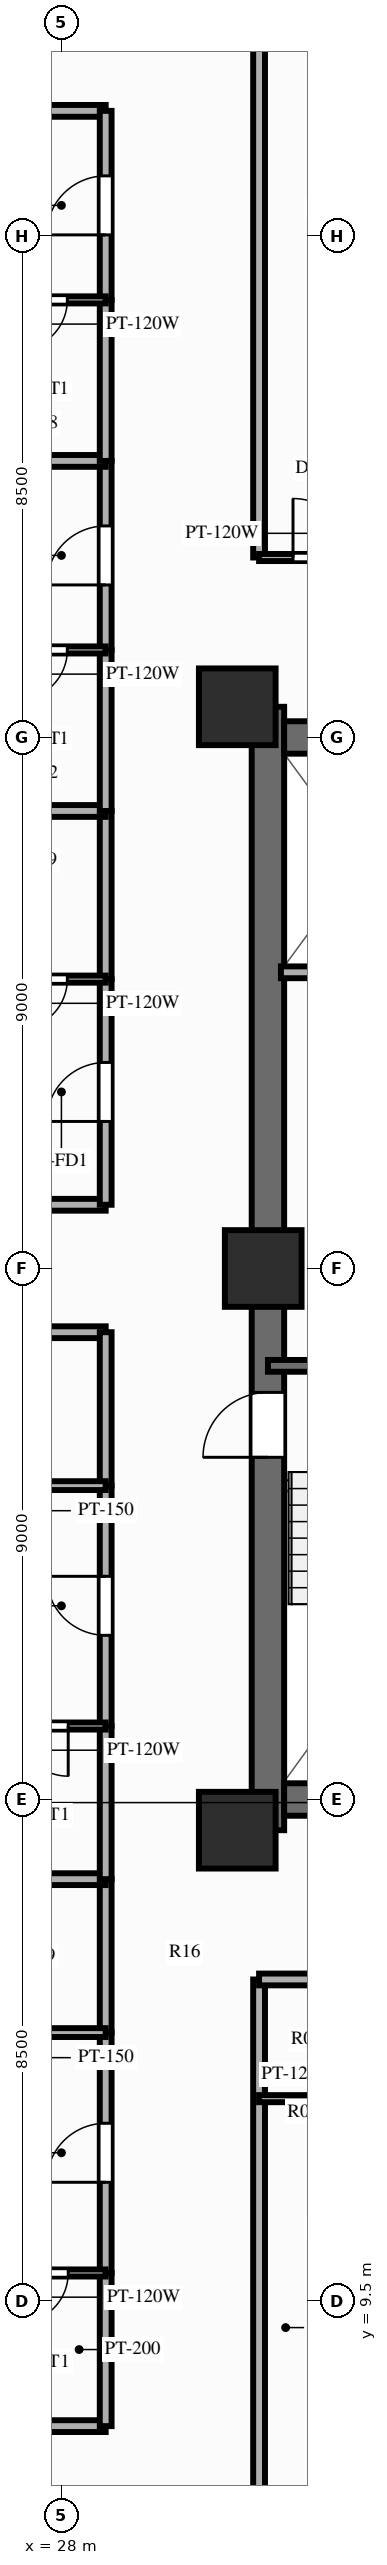
"""IFC4 building model, lengths in metres.
Left out: names, types, materials, properties, quantities, classifications, styles, units other than length and angle.
Written with IfcOpenShell. Run it as: python <this file> out.ifc"""

import sys

from ifc_helpers import new_model, si_unit, direction, frame, frame_2d, origin, origin_2d, place, context, subcontext, project, spatial, rectangle, extrude, source, transform, mapped, element, fill, save


model = new_model("IFC4")
c1 = context("Model", 3, precision=1e-05, world=origin(), true_north=direction((0.0, 1.0)))
c2 = subcontext(c1, "Body", "Model", "MODEL_VIEW")
j1 = project(units=[si_unit("LENGTHUNIT", "METRE"), si_unit("PLANEANGLEUNIT", "RADIAN")], contexts=[c1])
p1 = place(None, origin())
s1 = spatial("IfcSite", under=j1, at=p1, CompositionType="ELEMENT")
p2 = place(p1, origin())
s2 = spatial("IfcBuilding", under=s1, at=p2, CompositionType="ELEMENT")
p3 = place(p2, frame((0.0, 0.0, 113.85)))
s3 = spatial("IfcBuildingStorey", under=s2, at=p3, CompositionType="ELEMENT", Elevation=113.85)
p4 = place(p3, frame((31.5, 17.48, 0.0), z_axis=(0.0, 0.0, 1.0), x_axis=(0.0, 1.0, 0.0)))
e1 = element("IfcWall", 1, at=p4, inside=s3, PredefinedType="SHEAR", context=c2, shape_type="SweptSolid", body=[
    extrude(rectangle(XDim=19.04, YDim=0.55, at=frame_2d((9.52, 0.0))), origin(), (0.0, 0.0, 1.0), 3.0),
])
p5 = place(p4, frame((6.32, 0.0, 0.0)))
e2 = element("IfcOpeningElement", 2, at=p5, cuts=e1, PredefinedType="OPENING", context=c2, shape_type="SweptSolid", body=[
    extrude(rectangle(XDim=1.1, YDim=2.15, at=frame_2d((0.55, 1.075))), frame((0.0, 0.287, 0.0), z_axis=(0.0, -1.0, 0.0), x_axis=(1.0, 0.0, 0.0)), (0.0, 0.0, 1.0), 0.574),
])
p6 = place(p3, frame((31.775, 18.0, 0.0), z_axis=(0.0, 0.0, 1.0), x_axis=(1.0, 0.0, 0.0)))
e3 = element("IfcWall", 3, at=p6, inside=s3, PredefinedType="SHEAR", context=c2, shape_type="SweptSolid", body=[
    extrude(rectangle(XDim=12.45, YDim=0.55, at=frame_2d((6.225, 0.0))), origin(), (0.0, 0.0, 1.0), 3.0),
])
p7 = place(p3, frame((31.775, 36.0, 0.0), z_axis=(0.0, 0.0, 1.0), x_axis=(1.0, 0.0, 0.0)))
e4 = element("IfcWall", 4, at=p7, inside=s3, PredefinedType="SHEAR", context=c2, shape_type="SweptSolid", body=[
    extrude(rectangle(XDim=12.45, YDim=0.55, at=frame_2d((6.225, 0.0))), origin(), (0.0, 0.0, 1.0), 3.0),
])
p8 = place(p7, frame((5.175, 0.0, 0.0), z_axis=(0.0, 0.0, 1.0), x_axis=(-1.0, 0.0, 0.0)))
e5 = element("IfcOpeningElement", 5, at=p8, cuts=e4, PredefinedType="OPENING", context=c2, shape_type="SweptSolid", body=[
    extrude(rectangle(XDim=1.4, YDim=2.15, at=frame_2d((0.7, 1.075))), frame((0.0, 0.287, 0.0), z_axis=(0.0, -1.0, 0.0), x_axis=(1.0, 0.0, 0.0)), (0.0, 0.0, 1.0), 0.574),
])
m1 = source(origin(), c2, "Body", "SweptSolid", [
    extrude(rectangle(XDim=1.3, YDim=1.3, at=origin_2d()), origin(), (0.0, 0.0, 1.0), 3.0),
])
for number, where, z_axis, x_axis in (
    (6, (30.98, 17.48, 0.0), (0.0, 0.0, 1.0), (1.0, 0.0, 0.0)),
    (7, (30.98, 36.52, 0.0), (0.0, 0.0, 1.0), (1.0, 0.0, 0.0)),
    (8, (31.42, 27.0, 0.0), (0.0, 0.0, 1.0), (1.0, 0.0, 0.0)),
):
    element("IfcColumn", number, at=place(p3, frame(where, z_axis=z_axis, x_axis=x_axis)), inside=s3, PredefinedType="COLUMN", context=c2, shape_type="MappedRepresentation", body=[
        mapped(m1, transform((0.0, 0.0, 0.0), scale=1.0)),
    ])
p9 = place(p3, frame((31.5, 25.35, 0.0), z_axis=(0.0, 0.0, 1.0), x_axis=(1.0, 0.0, 0.0)))
e9 = element("IfcWall", 9, at=p9, inside=s3, PredefinedType="SOLIDWALL", context=c2, shape_type="SweptSolid", body=[
    extrude(rectangle(XDim=3.93, YDim=0.2, at=frame_2d((1.965, 0.0))), origin(), (0.0, 0.0, 1.0), 2.79),
])
p10 = place(p3, frame((31.72, 32.02, 0.0), z_axis=(0.0, 0.0, 1.0), x_axis=(1.0, 0.0, 0.0)))
e10 = element("IfcWall", 10, at=p10, inside=s3, PredefinedType="PARTITIONING", context=c2, shape_type="SweptSolid", body=[
    extrude(rectangle(XDim=2.8, YDim=0.2, at=frame_2d((1.4, 0.0))), origin(), (0.0, 0.0, 1.0), 2.79),
])
p11 = place(p3, frame((31.35, 14.95, 0.0), z_axis=(0.0, 0.0, 1.0), x_axis=(0.0, -1.0, 0.0)))
e11 = element("IfcWall", 11, at=p11, inside=s3, PredefinedType="PARTITIONING", context=c2, shape_type="SweptSolid", body=[
    extrude(rectangle(XDim=11.8, YDim=0.2, at=frame_2d((5.9, 0.0))), origin(), (0.0, 0.0, 1.0), 2.34),
])
p12 = place(p3, frame((31.35, 14.95, 0.0), z_axis=(0.0, 0.0, 1.0), x_axis=(1.0, 0.0, 0.0)))
e12 = element("IfcWall", 12, at=p12, inside=s3, PredefinedType="PARTITIONING", context=c2, shape_type="SweptSolid", body=[
    extrude(rectangle(XDim=3.458, YDim=0.2, at=frame_2d((1.729, 0.0))), origin(), (0.0, 0.0, 1.0), 2.79),
])
p13 = place(p3, frame((31.35, 12.93, 0.0), z_axis=(0.0, 0.0, 1.0), x_axis=(1.0, 0.0, 0.0)))
e13 = element("IfcWall", 13, at=p13, inside=s3, PredefinedType="PARTITIONING", context=c2, shape_type="SweptSolid", body=[
    extrude(rectangle(XDim=3.458, YDim=0.12, at=frame_2d((1.729, 0.0))), origin(), (0.0, 0.0, 1.0), 2.79),
])
p14 = place(p3, frame((31.35, 39.05, 0.0), z_axis=(0.0, 0.0, 1.0), x_axis=(0.0, 1.0, 0.0)))
e14 = element("IfcWall", 14, at=p14, inside=s3, PredefinedType="PARTITIONING", context=c2, shape_type="SweptSolid", body=[
    extrude(rectangle(XDim=11.8, YDim=0.2, at=frame_2d((5.9, 0.0))), origin(), (0.0, 0.0, 1.0), 2.34),
])
p15 = place(p3, frame((31.35, 39.05, 0.0), z_axis=(0.0, 0.0, 1.0), x_axis=(1.0, 0.0, 0.0)))
e15 = element("IfcWall", 15, at=p15, inside=s3, PredefinedType="PARTITIONING", context=c2, shape_type="SweptSolid", body=[
    extrude(rectangle(XDim=2.15, YDim=0.12, at=frame_2d((1.075, 0.0))), origin(), (0.0, 0.0, 1.0), 2.79),
])
p16 = place(p15, frame((0.575, 0.0, 0.0)))
e16 = element("IfcOpeningElement", 16, at=p16, cuts=e15, PredefinedType="OPENING", context=c2, shape_type="SweptSolid", body=[
    extrude(rectangle(XDim=1.0, YDim=2.1, at=frame_2d((0.5, 1.05))), frame((0.0, 0.072, 0.0), z_axis=(0.0, -1.0, 0.0), x_axis=(1.0, 0.0, 0.0)), (0.0, 0.0, 1.0), 0.144),
])
for number, where, z_axis, x_axis in (
    (17, (28.75, 7.38, 0.0), (0.0, 0.0, 1.0), (-1.0, 0.0, 0.0)),
    (18, (28.75, 25.92, 0.0), (0.0, 0.0, 1.0), (-1.0, 0.0, 0.0)),
):
    element("IfcWall", number, at=place(p3, frame(where, z_axis=z_axis, x_axis=x_axis)), inside=s3, PredefinedType="PARTITIONING", context=c2, shape_type="SweptSolid", body=[
        extrude(rectangle(XDim=16.6, YDim=0.2, at=frame_2d((8.3, 0.0))), origin(), (0.0, 0.0, 1.0), 2.79),
    ])
p17 = place(p3, frame((28.75, 7.38, 0.0), z_axis=(0.0, 0.0, 1.0), x_axis=(0.0, 1.0, 0.0)))
e19 = element("IfcWall", 19, at=p17, inside=s3, PredefinedType="PARTITIONING", context=c2, shape_type="SweptSolid", body=[
    extrude(rectangle(XDim=2.596, YDim=0.2, at=frame_2d((1.298, 0.0))), origin(), (0.0, 0.0, 1.0), 2.79),
])
p18 = place(p3, frame((28.75, 9.976, 0.0), z_axis=(0.0, 0.0, 1.0), x_axis=(0.0, 1.0, 0.0)))
e20 = element("IfcWall", 20, at=p18, inside=s3, PredefinedType="PARTITIONING", context=c2, shape_type="SweptSolid", body=[
    extrude(rectangle(XDim=4.074, YDim=0.2, at=frame_2d((2.037, 0.0))), origin(), (0.0, 0.0, 1.0), 2.79),
])
p19 = place(p18, frame((1.537, 0.0, 0.0)))
e21 = element("IfcOpeningElement", 21, at=p19, cuts=e20, PredefinedType="OPENING", context=c2, shape_type="SweptSolid", body=[
    extrude(rectangle(XDim=1.0, YDim=2.15, at=frame_2d((0.5, 1.075))), frame((0.0, 0.112, 0.0), z_axis=(0.0, -1.0, 0.0), x_axis=(1.0, 0.0, 0.0)), (0.0, 0.0, 1.0), 0.224),
])
p20 = place(p3, frame((28.75, 14.05, 0.0), z_axis=(0.0, 0.0, 1.0), x_axis=(0.0, 1.0, 0.0)))
e22 = element("IfcWall", 22, at=p20, inside=s3, PredefinedType="PARTITIONING", context=c2, shape_type="SweptSolid", body=[
    extrude(rectangle(XDim=2.6, YDim=0.2, at=frame_2d((1.3, 0.0))), origin(), (0.0, 0.0, 1.0), 2.79),
])
p21 = place(p3, frame((28.75, 9.976, 0.0), z_axis=(0.0, 0.0, 1.0), x_axis=(-1.0, 0.0, 0.0)))
e23 = element("IfcWall", 23, at=p21, inside=s3, PredefinedType="PARTITIONING", context=c2, shape_type="SweptSolid", body=[
    extrude(rectangle(XDim=2.12, YDim=0.12, at=frame_2d((1.06, 0.0))), origin(), (0.0, 0.0, 1.0), 2.79),
])
p22 = place(p21, frame((0.635, 0.0, 0.0)))
e24 = element("IfcOpeningElement", 24, at=p22, cuts=e23, PredefinedType="OPENING", context=c2, shape_type="SweptSolid", body=[
    extrude(rectangle(XDim=0.85, YDim=2.05, at=frame_2d((0.425, 1.025))), frame((0.0, 0.072, 0.0), z_axis=(0.0, -1.0, 0.0), x_axis=(1.0, 0.0, 0.0)), (0.0, 0.0, 1.0), 0.144),
])
p23 = place(p3, frame((28.75, 14.05, 0.0), z_axis=(0.0, 0.0, 1.0), x_axis=(-1.0, 0.0, 0.0)))
e25 = element("IfcWall", 25, at=p23, inside=s3, PredefinedType="PARTITIONING", context=c2, shape_type="SweptSolid", body=[
    extrude(rectangle(XDim=3.08, YDim=0.15, at=frame_2d((1.54, 0.0))), origin(), (0.0, 0.0, 1.0), 2.79),
])
p24 = place(p23, frame((1.09, 0.0, 0.0)))
e26 = element("IfcOpeningElement", 26, at=p24, cuts=e25, PredefinedType="OPENING", context=c2, shape_type="SweptSolid", body=[
    extrude(rectangle(XDim=0.9, YDim=2.1, at=frame_2d((0.45, 1.05))), frame((0.0, 0.087, 0.0), z_axis=(0.0, -1.0, 0.0), x_axis=(1.0, 0.0, 0.0)), (0.0, 0.0, 1.0), 0.174),
])
p25 = place(p3, frame((28.75, 16.65, 0.0), z_axis=(0.0, 0.0, 1.0), x_axis=(-1.0, 0.0, 0.0)))
e27 = element("IfcWall", 27, at=p25, inside=s3, PredefinedType="PARTITIONING", context=c2, shape_type="SweptSolid", body=[
    extrude(rectangle(XDim=16.6, YDim=0.2, at=frame_2d((8.3, 0.0))), origin(), (0.0, 0.0, 1.0), 2.79),
])
p26 = place(p3, frame((28.75, 16.65, 0.0), z_axis=(0.0, 0.0, 1.0), x_axis=(0.0, 1.0, 0.0)))
e28 = element("IfcWall", 28, at=p26, inside=s3, PredefinedType="PARTITIONING", context=c2, shape_type="SweptSolid", body=[
    extrude(rectangle(XDim=2.596, YDim=0.2, at=frame_2d((1.298, 0.0))), origin(), (0.0, 0.0, 1.0), 2.79),
])
p27 = place(p3, frame((28.75, 19.246, 0.0), z_axis=(0.0, 0.0, 1.0), x_axis=(0.0, 1.0, 0.0)))
e29 = element("IfcWall", 29, at=p27, inside=s3, PredefinedType="PARTITIONING", context=c2, shape_type="SweptSolid", body=[
    extrude(rectangle(XDim=4.074, YDim=0.2, at=frame_2d((2.037, 0.0))), origin(), (0.0, 0.0, 1.0), 2.79),
])
p28 = place(p27, frame((1.537, 0.0, 0.0)))
e30 = element("IfcOpeningElement", 30, at=p28, cuts=e29, PredefinedType="OPENING", context=c2, shape_type="SweptSolid", body=[
    extrude(rectangle(XDim=1.0, YDim=2.15, at=frame_2d((0.5, 1.075))), frame((0.0, 0.112, 0.0), z_axis=(0.0, -1.0, 0.0), x_axis=(1.0, 0.0, 0.0)), (0.0, 0.0, 1.0), 0.224),
])
p29 = place(p3, frame((28.75, 23.32, 0.0), z_axis=(0.0, 0.0, 1.0), x_axis=(0.0, 1.0, 0.0)))
e31 = element("IfcWall", 31, at=p29, inside=s3, PredefinedType="PARTITIONING", context=c2, shape_type="SweptSolid", body=[
    extrude(rectangle(XDim=2.6, YDim=0.2, at=frame_2d((1.3, 0.0))), origin(), (0.0, 0.0, 1.0), 2.79),
])
p30 = place(p3, frame((28.75, 19.246, 0.0), z_axis=(0.0, 0.0, 1.0), x_axis=(-1.0, 0.0, 0.0)))
e32 = element("IfcWall", 32, at=p30, inside=s3, PredefinedType="PARTITIONING", context=c2, shape_type="SweptSolid", body=[
    extrude(rectangle(XDim=2.12, YDim=0.12, at=frame_2d((1.06, 0.0))), origin(), (0.0, 0.0, 1.0), 2.79),
])
p31 = place(p30, frame((0.635, 0.0, 0.0)))
e33 = element("IfcOpeningElement", 33, at=p31, cuts=e32, PredefinedType="OPENING", context=c2, shape_type="SweptSolid", body=[
    extrude(rectangle(XDim=0.85, YDim=2.05, at=frame_2d((0.425, 1.025))), frame((0.0, 0.072, 0.0), z_axis=(0.0, -1.0, 0.0), x_axis=(1.0, 0.0, 0.0)), (0.0, 0.0, 1.0), 0.144),
])
p32 = place(p3, frame((28.75, 23.32, 0.0), z_axis=(0.0, 0.0, 1.0), x_axis=(-1.0, 0.0, 0.0)))
e34 = element("IfcWall", 34, at=p32, inside=s3, PredefinedType="PARTITIONING", context=c2, shape_type="SweptSolid", body=[
    extrude(rectangle(XDim=3.08, YDim=0.15, at=frame_2d((1.54, 0.0))), origin(), (0.0, 0.0, 1.0), 2.79),
])
p33 = place(p32, frame((1.09, 0.0, 0.0)))
e35 = element("IfcOpeningElement", 35, at=p33, cuts=e34, PredefinedType="OPENING", context=c2, shape_type="SweptSolid", body=[
    extrude(rectangle(XDim=0.9, YDim=2.1, at=frame_2d((0.45, 1.05))), frame((0.0, 0.087, 0.0), z_axis=(0.0, -1.0, 0.0), x_axis=(1.0, 0.0, 0.0)), (0.0, 0.0, 1.0), 0.174),
])
for number, where, z_axis, x_axis in (
    (36, (28.75, 28.08, 0.0), (0.0, 0.0, 1.0), (-1.0, 0.0, 0.0)),
    (37, (28.75, 46.62, 0.0), (0.0, 0.0, 1.0), (-1.0, 0.0, 0.0)),
):
    element("IfcWall", number, at=place(p3, frame(where, z_axis=z_axis, x_axis=x_axis)), inside=s3, PredefinedType="PARTITIONING", context=c2, shape_type="SweptSolid", body=[
        extrude(rectangle(XDim=16.6, YDim=0.2, at=frame_2d((8.3, 0.0))), origin(), (0.0, 0.0, 1.0), 2.79),
    ])
p34 = place(p3, frame((28.75, 28.08, 0.0), z_axis=(0.0, 0.0, 1.0), x_axis=(0.0, 1.0, 0.0)))
e38 = element("IfcWall", 38, at=p34, inside=s3, PredefinedType="PARTITIONING", context=c2, shape_type="SweptSolid", body=[
    extrude(rectangle(XDim=3.824, YDim=0.2, at=frame_2d((1.912, 0.0))), origin(), (0.0, 0.0, 1.0), 2.79),
])
p35 = place(p34, frame((1.412, 0.0, 0.0)))
e39 = element("IfcOpeningElement", 39, at=p35, cuts=e38, PredefinedType="OPENING", context=c2, shape_type="SweptSolid", body=[
    extrude(rectangle(XDim=1.0, YDim=2.15, at=frame_2d((0.5, 1.075))), frame((0.0, 0.112, 0.0), z_axis=(0.0, -1.0, 0.0), x_axis=(1.0, 0.0, 0.0)), (0.0, 0.0, 1.0), 0.224),
])
p36 = place(p3, frame((28.75, 31.904, 0.0), z_axis=(0.0, 0.0, 1.0), x_axis=(0.0, 1.0, 0.0)))
e40 = element("IfcWall", 40, at=p36, inside=s3, PredefinedType="PARTITIONING", context=c2, shape_type="SweptSolid", body=[
    extrude(rectangle(XDim=2.85, YDim=0.2, at=frame_2d((1.425, 0.0))), origin(), (0.0, 0.0, 1.0), 2.79),
])
p37 = place(p3, frame((28.75, 31.904, 0.0), z_axis=(0.0, 0.0, 1.0), x_axis=(-1.0, 0.0, 0.0)))
e41 = element("IfcWall", 41, at=p37, inside=s3, PredefinedType="PARTITIONING", context=c2, shape_type="SweptSolid", body=[
    extrude(rectangle(XDim=2.15, YDim=0.12, at=frame_2d((1.075, 0.0))), origin(), (0.0, 0.0, 1.0), 2.79),
])
p38 = place(p37, frame((0.65, 0.0, 0.0)))
e42 = element("IfcOpeningElement", 42, at=p38, cuts=e41, PredefinedType="OPENING", context=c2, shape_type="SweptSolid", body=[
    extrude(rectangle(XDim=0.85, YDim=2.05, at=frame_2d((0.425, 1.025))), frame((0.0, 0.072, 0.0), z_axis=(0.0, -1.0, 0.0), x_axis=(1.0, 0.0, 0.0)), (0.0, 0.0, 1.0), 0.144),
])
p39 = place(p3, frame((28.75, 34.754, 0.0), z_axis=(0.0, 0.0, 1.0), x_axis=(-1.0, 0.0, 0.0)))
e43 = element("IfcWall", 43, at=p39, inside=s3, PredefinedType="PARTITIONING", context=c2, shape_type="SweptSolid", body=[
    extrude(rectangle(XDim=16.6, YDim=0.2, at=frame_2d((8.3, 0.0))), origin(), (0.0, 0.0, 1.0), 2.79),
])
p40 = place(p3, frame((28.75, 34.754, 0.0), z_axis=(0.0, 0.0, 1.0), x_axis=(0.0, 1.0, 0.0)))
e44 = element("IfcWall", 44, at=p40, inside=s3, PredefinedType="PARTITIONING", context=c2, shape_type="SweptSolid", body=[
    extrude(rectangle(XDim=2.729, YDim=0.2, at=frame_2d((1.365, 0.0))), origin(), (0.0, 0.0, 1.0), 2.79),
])
p41 = place(p3, frame((28.75, 37.483, 0.0), z_axis=(0.0, 0.0, 1.0), x_axis=(0.0, 1.0, 0.0)))
e45 = element("IfcWall", 45, at=p41, inside=s3, PredefinedType="PARTITIONING", context=c2, shape_type="SweptSolid", body=[
    extrude(rectangle(XDim=3.204, YDim=0.2, at=frame_2d((1.602, 0.0))), origin(), (0.0, 0.0, 1.0), 2.79),
])
p42 = place(p41, frame((1.102, 0.0, 0.0)))
e46 = element("IfcOpeningElement", 46, at=p42, cuts=e45, PredefinedType="OPENING", context=c2, shape_type="SweptSolid", body=[
    extrude(rectangle(XDim=1.0, YDim=2.15, at=frame_2d((0.5, 1.075))), frame((0.0, 0.112, 0.0), z_axis=(0.0, -1.0, 0.0), x_axis=(1.0, 0.0, 0.0)), (0.0, 0.0, 1.0), 0.224),
])
p43 = place(p3, frame((28.75, 37.483, 0.0), z_axis=(0.0, 0.0, 1.0), x_axis=(-1.0, 0.0, 0.0)))
e47 = element("IfcWall", 47, at=p43, inside=s3, PredefinedType="PARTITIONING", context=c2, shape_type="SweptSolid", body=[
    extrude(rectangle(XDim=2.15, YDim=0.12, at=frame_2d((1.075, 0.0))), origin(), (0.0, 0.0, 1.0), 2.79),
])
p44 = place(p43, frame((0.65, 0.0, 0.0)))
e48 = element("IfcOpeningElement", 48, at=p44, cuts=e47, PredefinedType="OPENING", context=c2, shape_type="SweptSolid", body=[
    extrude(rectangle(XDim=0.85, YDim=2.05, at=frame_2d((0.425, 1.025))), frame((0.0, 0.072, 0.0), z_axis=(0.0, -1.0, 0.0), x_axis=(1.0, 0.0, 0.0)), (0.0, 0.0, 1.0), 0.144),
])
p45 = place(p3, frame((28.75, 40.687, 0.0), z_axis=(0.0, 0.0, 1.0), x_axis=(-1.0, 0.0, 0.0)))
e49 = element("IfcWall", 49, at=p45, inside=s3, PredefinedType="PARTITIONING", context=c2, shape_type="SweptSolid", body=[
    extrude(rectangle(XDim=16.6, YDim=0.2, at=frame_2d((8.3, 0.0))), origin(), (0.0, 0.0, 1.0), 2.79),
])
p46 = place(p3, frame((28.75, 40.687, 0.0), z_axis=(0.0, 0.0, 1.0), x_axis=(0.0, 1.0, 0.0)))
e50 = element("IfcWall", 50, at=p46, inside=s3, PredefinedType="PARTITIONING", context=c2, shape_type="SweptSolid", body=[
    extrude(rectangle(XDim=2.729, YDim=0.2, at=frame_2d((1.365, 0.0))), origin(), (0.0, 0.0, 1.0), 2.79),
])
p47 = place(p3, frame((28.75, 43.416, 0.0), z_axis=(0.0, 0.0, 1.0), x_axis=(0.0, 1.0, 0.0)))
e51 = element("IfcWall", 51, at=p47, inside=s3, PredefinedType="PARTITIONING", context=c2, shape_type="SweptSolid", body=[
    extrude(rectangle(XDim=3.204, YDim=0.2, at=frame_2d((1.602, 0.0))), origin(), (0.0, 0.0, 1.0), 2.79),
])
p48 = place(p47, frame((1.102, 0.0, 0.0)))
e52 = element("IfcOpeningElement", 52, at=p48, cuts=e51, PredefinedType="OPENING", context=c2, shape_type="SweptSolid", body=[
    extrude(rectangle(XDim=1.0, YDim=2.15, at=frame_2d((0.5, 1.075))), frame((0.0, 0.112, 0.0), z_axis=(0.0, -1.0, 0.0), x_axis=(1.0, 0.0, 0.0)), (0.0, 0.0, 1.0), 0.224),
])
p49 = place(p3, frame((28.75, 43.416, 0.0), z_axis=(0.0, 0.0, 1.0), x_axis=(-1.0, 0.0, 0.0)))
e53 = element("IfcWall", 53, at=p49, inside=s3, PredefinedType="PARTITIONING", context=c2, shape_type="SweptSolid", body=[
    extrude(rectangle(XDim=2.15, YDim=0.12, at=frame_2d((1.075, 0.0))), origin(), (0.0, 0.0, 1.0), 2.79),
])
p50 = place(p49, frame((0.65, 0.0, 0.0)))
e54 = element("IfcOpeningElement", 54, at=p50, cuts=e53, PredefinedType="OPENING", context=c2, shape_type="SweptSolid", body=[
    extrude(rectangle(XDim=0.85, YDim=2.05, at=frame_2d((0.425, 1.025))), frame((0.0, 0.072, 0.0), z_axis=(0.0, -1.0, 0.0), x_axis=(1.0, 0.0, 0.0)), (0.0, 0.0, 1.0), 0.144),
])
m2 = source(origin(), c2, "Body", "SweptSolid", [
    extrude(rectangle(XDim=1.1, YDim=2.15, at=frame_2d((0.55, 1.075))), frame((0.0, 0.025, 0.0), z_axis=(0.0, -1.0, 0.0), x_axis=(1.0, 0.0, 0.0)), (0.0, 0.0, 1.0), 0.05),
])
p51 = place(p5, origin())
e55 = element("IfcDoor", 55, at=p51, inside=s3, OperationType="SINGLE_SWING_LEFT", PredefinedType="DOOR", context=c2, shape_type="MappedRepresentation", body=[
    mapped(m2, transform((0.0, 0.0, 0.0), scale=1.0)),
])
fill(e2, e55)
m3 = source(origin(), c2, "Body", "SweptSolid", [
    extrude(rectangle(XDim=1.0, YDim=2.1, at=frame_2d((0.5, 1.05))), frame((0.0, 0.025, 0.0), z_axis=(0.0, -1.0, 0.0), x_axis=(1.0, 0.0, 0.0)), (0.0, 0.0, 1.0), 0.05),
])
p52 = place(p16, origin())
e56 = element("IfcDoor", 56, at=p52, inside=s3, OperationType="SINGLE_SWING_LEFT", PredefinedType="DOOR", context=c2, shape_type="MappedRepresentation", body=[
    mapped(m3, transform((0.0, 0.0, 0.0), scale=1.0)),
])
fill(e16, e56)
m4 = source(origin(), c2, "Body", "SweptSolid", [
    extrude(rectangle(XDim=1.0, YDim=2.15, at=frame_2d((0.5, 1.075))), frame((0.0, 0.025, 0.0), z_axis=(0.0, -1.0, 0.0), x_axis=(1.0, 0.0, 0.0)), (0.0, 0.0, 1.0), 0.05),
])
p53 = place(p19, origin())
e57 = element("IfcDoor", 57, at=p53, inside=s3, OperationType="SINGLE_SWING_LEFT", PredefinedType="DOOR", context=c2, shape_type="MappedRepresentation", body=[
    mapped(m4, transform((0.0, 0.0, 0.0), scale=1.0)),
])
fill(e21, e57)
m5 = source(origin(), c2, "Body", "SweptSolid", [
    extrude(rectangle(XDim=0.85, YDim=2.05, at=frame_2d((0.425, 1.025))), frame((0.0, 0.025, 0.0), z_axis=(0.0, -1.0, 0.0), x_axis=(1.0, 0.0, 0.0)), (0.0, 0.0, 1.0), 0.05),
])
p54 = place(p22, origin())
e58 = element("IfcDoor", 58, at=p54, inside=s3, OperationType="SINGLE_SWING_RIGHT", PredefinedType="DOOR", context=c2, shape_type="MappedRepresentation", body=[
    mapped(m5, transform((0.0, 0.0, 0.0), scale=1.0)),
])
fill(e24, e58)
p55 = place(p28, origin())
e59 = element("IfcDoor", 59, at=p55, inside=s3, OperationType="SINGLE_SWING_RIGHT", PredefinedType="DOOR", context=c2, shape_type="MappedRepresentation", body=[
    mapped(m4, transform((0.0, 0.0, 0.0), scale=1.0)),
])
fill(e30, e59)
p56 = place(p31, origin())
e60 = element("IfcDoor", 60, at=p56, inside=s3, OperationType="SINGLE_SWING_LEFT", PredefinedType="DOOR", context=c2, shape_type="MappedRepresentation", body=[
    mapped(m5, transform((0.0, 0.0, 0.0), scale=1.0)),
])
fill(e33, e60)
p57 = place(p35, origin())
e61 = element("IfcDoor", 61, at=p57, inside=s3, OperationType="SINGLE_SWING_LEFT", PredefinedType="DOOR", context=c2, shape_type="MappedRepresentation", body=[
    mapped(m4, transform((0.0, 0.0, 0.0), scale=1.0)),
])
fill(e39, e61)
p58 = place(p38, origin())
e62 = element("IfcDoor", 62, at=p58, inside=s3, OperationType="SINGLE_SWING_RIGHT", PredefinedType="DOOR", context=c2, shape_type="MappedRepresentation", body=[
    mapped(m5, transform((0.0, 0.0, 0.0), scale=1.0)),
])
fill(e42, e62)
p59 = place(p42, origin())
e63 = element("IfcDoor", 63, at=p59, inside=s3, OperationType="SINGLE_SWING_LEFT", PredefinedType="DOOR", context=c2, shape_type="MappedRepresentation", body=[
    mapped(m4, transform((0.0, 0.0, 0.0), scale=1.0)),
])
fill(e46, e63)
p60 = place(p44, origin())
e64 = element("IfcDoor", 64, at=p60, inside=s3, OperationType="SINGLE_SWING_RIGHT", PredefinedType="DOOR", context=c2, shape_type="MappedRepresentation", body=[
    mapped(m5, transform((0.0, 0.0, 0.0), scale=1.0)),
])
fill(e48, e64)
p61 = place(p48, origin())
e65 = element("IfcDoor", 65, at=p61, inside=s3, OperationType="SINGLE_SWING_LEFT", PredefinedType="DOOR", context=c2, shape_type="MappedRepresentation", body=[
    mapped(m4, transform((0.0, 0.0, 0.0), scale=1.0)),
])
fill(e52, e65)
p62 = place(p50, origin())
e66 = element("IfcDoor", 66, at=p62, inside=s3, OperationType="SINGLE_SWING_RIGHT", PredefinedType="DOOR", context=c2, shape_type="MappedRepresentation", body=[
    mapped(m5, transform((0.0, 0.0, 0.0), scale=1.0)),
])
fill(e54, e66)
save(model, sys.argv[1])
